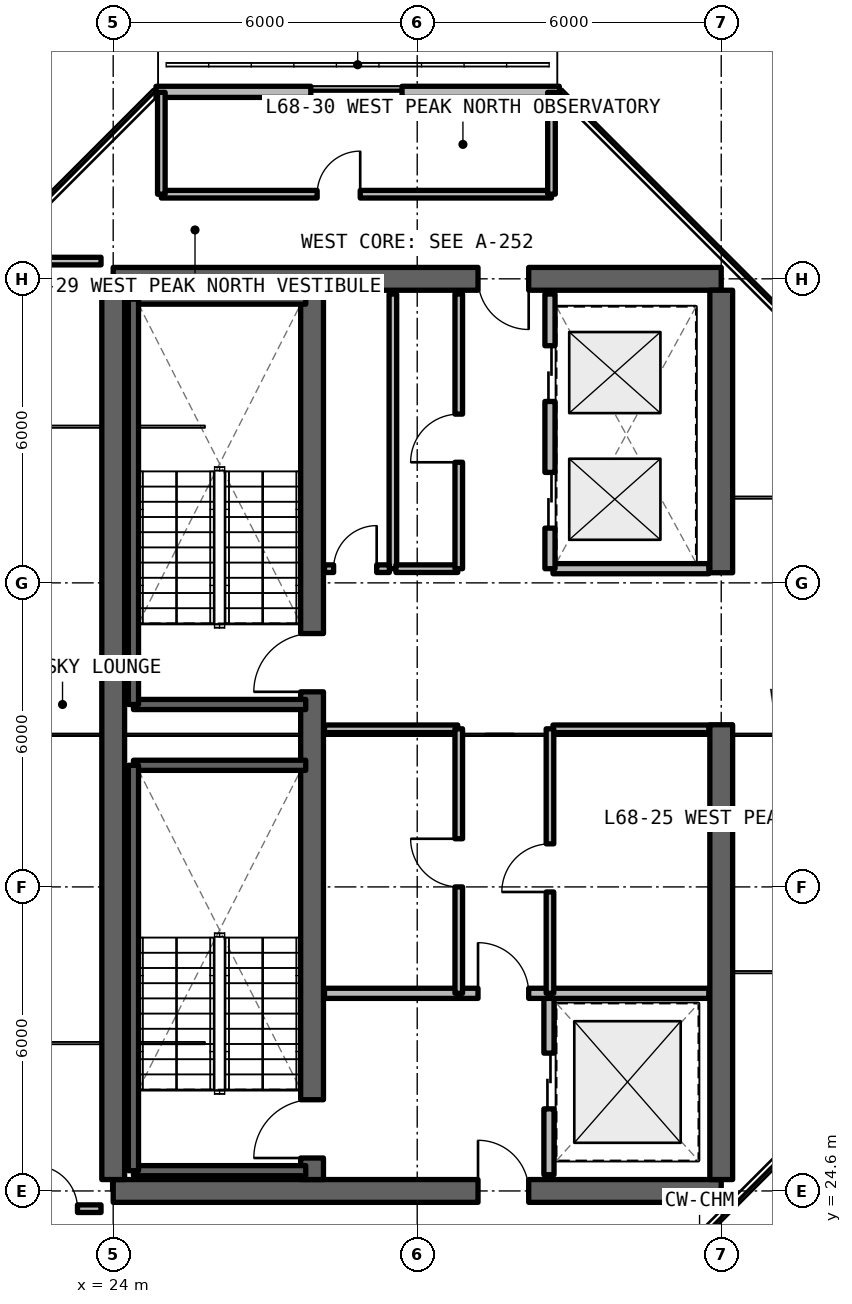
"""IFC4 building model, lengths in metres.
Left out: names, types, materials, properties, quantities, classifications, styles, units other than length and angle.
Written with IfcOpenShell. Run it as: python <this file> out.ifc"""

import sys

from ifc_helpers import new_model, si_unit, direction, frame, frame_2d, origin, place, context, subcontext, project, spatial, rectangle, extrude, element, fill, save


model = new_model("IFC4")
c1 = context("Model", 3, precision=1e-05, world=origin(), true_north=direction((0.0, 1.0)))
c2 = subcontext(c1, "Body", "Model", "MODEL_VIEW")
j1 = project(units=[si_unit("LENGTHUNIT", "METRE"), si_unit("PLANEANGLEUNIT", "RADIAN")], contexts=[c1])
p1 = place(None, origin())
s1 = spatial("IfcSite", under=j1, at=p1, CompositionType="ELEMENT")
p2 = place(p1, origin())
s2 = spatial("IfcBuilding", under=s1, at=p2, CompositionType="ELEMENT")
p3 = place(p2, frame((0.0, 0.0, 242.55)))
s3 = spatial("IfcBuildingStorey", under=s2, at=p3, CompositionType="ELEMENT", Elevation=242.55)
p4 = place(p3, frame((24.0, 24.6, 0.0), z_axis=(0.0, 0.0, 1.0), x_axis=(1.0, 0.0, 0.0)))
e1 = element("IfcWall", 1, at=p4, inside=s3, PredefinedType="SHEAR", context=c2, shape_type="SweptSolid", body=[
    extrude(rectangle(XDim=12.0, YDim=0.45, at=frame_2d((6.0, 0.0))), origin(), (0.0, 0.0, 1.0), 3.63),
])
p5 = place(p4, frame((7.2, 0.0, 0.0)))
e2 = element("IfcOpeningElement", 2, at=p5, cuts=e1, PredefinedType="OPENING", context=c2, shape_type="SweptSolid", body=[
    extrude(rectangle(XDim=1.0, YDim=2.15, at=frame_2d((0.5, 1.075))), frame((0.0, 0.235, 0.0), z_axis=(0.0, -1.0, 0.0), x_axis=(1.0, 0.0, 0.0)), (0.0, 0.0, 1.0), 0.47),
])
p6 = place(p3, frame((36.0, 42.6, 0.0), z_axis=(0.0, 0.0, 1.0), x_axis=(-1.0, 0.0, 0.0)))
e3 = element("IfcWall", 3, at=p6, inside=s3, PredefinedType="SHEAR", context=c2, shape_type="SweptSolid", body=[
    extrude(rectangle(XDim=12.0, YDim=0.45, at=frame_2d((6.0, 0.0))), origin(), (0.0, 0.0, 1.0), 3.63),
])
p7 = place(p6, frame((3.8, 0.0, 0.0)))
e4 = element("IfcOpeningElement", 4, at=p7, cuts=e3, PredefinedType="OPENING", context=c2, shape_type="SweptSolid", body=[
    extrude(rectangle(XDim=1.0, YDim=2.15, at=frame_2d((0.5, 1.075))), frame((0.0, 0.235, 0.0), z_axis=(0.0, -1.0, 0.0), x_axis=(1.0, 0.0, 0.0)), (0.0, 0.0, 1.0), 0.47),
])
p8 = place(p3, frame((24.0, 24.825, 0.0), z_axis=(0.0, 0.0, 1.0), x_axis=(0.0, 1.0, 0.0)))
e5 = element("IfcWall", 5, at=p8, inside=s3, PredefinedType="SHEAR", context=c2, shape_type="SweptSolid", body=[
    extrude(rectangle(XDim=17.55, YDim=0.45, at=frame_2d((8.775, 0.0))), origin(), (0.0, 0.0, 1.0), 3.63),
])
p9 = place(p3, frame((36.0, 24.825, 0.0), z_axis=(0.0, 0.0, 1.0), x_axis=(0.0, 1.0, 0.0)))
e6 = element("IfcWall", 6, at=p9, inside=s3, PredefinedType="SHEAR", context=c2, shape_type="SweptSolid", body=[
    extrude(rectangle(XDim=8.975, YDim=0.45, at=frame_2d((4.488, 0.0))), origin(), (0.0, 0.0, 1.0), 3.63),
])
p10 = place(p3, frame((36.0, 36.8, 0.0), z_axis=(0.0, 0.0, 1.0), x_axis=(0.0, 1.0, 0.0)))
e7 = element("IfcWall", 7, at=p10, inside=s3, PredefinedType="SHEAR", context=c2, shape_type="SweptSolid", body=[
    extrude(rectangle(XDim=5.575, YDim=0.45, at=frame_2d((2.788, 0.0))), origin(), (0.0, 0.0, 1.0), 3.63),
])
p11 = place(p3, frame((27.925, 24.825, 0.0), z_axis=(0.0, 0.0, 1.0), x_axis=(0.0, 1.0, 0.0)))
e8 = element("IfcWall", 8, at=p11, inside=s3, PredefinedType="SHEAR", context=c2, shape_type="SweptSolid", body=[
    extrude(rectangle(XDim=17.55, YDim=0.45, at=frame_2d((8.775, 0.0))), origin(), (0.0, 0.0, 1.0), 3.63),
])
p12 = place(p11, frame((0.425, 0.0, 0.0)))
e9 = element("IfcOpeningElement", 9, at=p12, cuts=e8, PredefinedType="OPENING", context=c2, shape_type="SweptSolid", body=[
    extrude(rectangle(XDim=1.15, YDim=2.15, at=frame_2d((0.575, 1.075))), frame((0.0, 0.235, 0.0), z_axis=(0.0, -1.0, 0.0), x_axis=(1.0, 0.0, 0.0)), (0.0, 0.0, 1.0), 0.47),
])
p13 = place(p11, frame((9.625, 0.0, 0.0)))
e10 = element("IfcOpeningElement", 10, at=p13, cuts=e8, PredefinedType="OPENING", context=c2, shape_type="SweptSolid", body=[
    extrude(rectangle(XDim=1.15, YDim=2.15, at=frame_2d((0.575, 1.075))), frame((0.0, 0.235, 0.0), z_axis=(0.0, -1.0, 0.0), x_axis=(1.0, 0.0, 0.0)), (0.0, 0.0, 1.0), 0.47),
])
p14 = place(p3, frame((32.804, 46.29, 0.0), z_axis=(0.0, 0.0, 1.0), x_axis=(-1.0, 0.0, 0.0)))
e11 = element("IfcWall", 11, at=p14, inside=s3, PredefinedType="SOLIDWALL", context=c2, shape_type="SweptSolid", body=[
    extrude(rectangle(XDim=7.959, YDim=0.22, at=frame_2d((3.979, 0.0))), origin(), (0.0, 0.0, 1.0), 3.41),
])
p15 = place(p14, frame((3.104, 0.0, 0.78)))
e12 = element("IfcOpeningElement", 12, at=p15, cuts=e11, PredefinedType="OPENING", context=c2, shape_type="SweptSolid", body=[
    extrude(rectangle(XDim=1.8, YDim=1.66, at=frame_2d((0.9, 0.83))), frame((0.0, 0.12, 0.0), z_axis=(0.0, -1.0, 0.0), x_axis=(1.0, 0.0, 0.0)), (0.0, 0.0, 1.0), 0.24),
])
p16 = place(p3, frame((32.6, 24.92, 0.0), z_axis=(0.0, 0.0, 1.0), x_axis=(0.0, 1.0, 0.0)))
e13 = element("IfcWall", 13, at=p16, inside=s3, PredefinedType="SOLIDWALL", context=c2, shape_type="SweptSolid", body=[
    extrude(rectangle(XDim=3.58, YDim=0.2, at=frame_2d((1.79, 0.0))), origin(), (0.0, 0.0, 1.0), 2.63),
])
p17 = place(p16, frame((1.3, 0.0, 0.0)))
e14 = element("IfcOpeningElement", 14, at=p17, cuts=e13, PredefinedType="OPENING", context=c2, shape_type="SweptSolid", body=[
    extrude(rectangle(XDim=1.1, YDim=2.2, at=frame_2d((0.55, 1.1))), frame((0.0, 0.11, 0.0), z_axis=(0.0, -1.0, 0.0), x_axis=(1.0, 0.0, 0.0)), (0.0, 0.0, 1.0), 0.22),
])
p18 = place(p3, frame((28.17, 28.5, 0.0), z_axis=(0.0, 0.0, 1.0), x_axis=(1.0, 0.0, 0.0)))
e15 = element("IfcWall", 15, at=p18, inside=s3, PredefinedType="SOLIDWALL", context=c2, shape_type="SweptSolid", body=[
    extrude(rectangle(XDim=7.585, YDim=0.2, at=frame_2d((3.792, 0.0))), origin(), (0.0, 0.0, 1.0), 2.63),
])
p19 = place(p18, frame((3.03, 0.0, 0.0)))
e16 = element("IfcOpeningElement", 16, at=p19, cuts=e15, PredefinedType="OPENING", context=c2, shape_type="SweptSolid", body=[
    extrude(rectangle(XDim=1.0, YDim=2.15, at=frame_2d((0.5, 1.075))), frame((0.0, 0.11, 0.0), z_axis=(0.0, -1.0, 0.0), x_axis=(1.0, 0.0, 0.0)), (0.0, 0.0, 1.0), 0.22),
])
p20 = place(p3, frame((28.17, 33.72, 0.0), z_axis=(0.0, 0.0, 1.0), x_axis=(1.0, 0.0, 0.0)))
e17 = element("IfcWall", 17, at=p20, inside=s3, PredefinedType="SOLIDWALL", context=c2, shape_type="SweptSolid", body=[
    extrude(rectangle(XDim=2.63, YDim=0.15, at=frame_2d((1.315, 0.0))), origin(), (0.0, 0.0, 1.0), 2.63),
])
p21 = place(p3, frame((30.82, 28.5, 0.0), z_axis=(0.0, 0.0, 1.0), x_axis=(0.0, 1.0, 0.0)))
e18 = element("IfcWall", 18, at=p21, inside=s3, PredefinedType="SOLIDWALL", context=c2, shape_type="SweptSolid", body=[
    extrude(rectangle(XDim=5.22, YDim=0.15, at=frame_2d((2.61, 0.0))), origin(), (0.0, 0.0, 1.0), 2.63),
])
p22 = place(p21, frame((2.1, 0.0, 0.0)))
e19 = element("IfcOpeningElement", 19, at=p22, cuts=e18, PredefinedType="OPENING", context=c2, shape_type="SweptSolid", body=[
    extrude(rectangle(XDim=0.95, YDim=2.15, at=frame_2d((0.475, 1.075))), frame((0.0, 0.085, 0.0), z_axis=(0.0, -1.0, 0.0), x_axis=(1.0, 0.0, 0.0)), (0.0, 0.0, 1.0), 0.17),
])
p23 = place(p3, frame((32.68, 33.72, 0.0), z_axis=(0.0, 0.0, 1.0), x_axis=(1.0, 0.0, 0.0)))
e20 = element("IfcWall", 20, at=p23, inside=s3, PredefinedType="SOLIDWALL", context=c2, shape_type="SweptSolid", body=[
    extrude(rectangle(XDim=3.075, YDim=0.15, at=frame_2d((1.538, 0.0))), origin(), (0.0, 0.0, 1.0), 2.63),
])
p24 = place(p3, frame((32.62, 28.5, 0.0), z_axis=(0.0, 0.0, 1.0), x_axis=(0.0, 1.0, 0.0)))
e21 = element("IfcWall", 21, at=p24, inside=s3, PredefinedType="SOLIDWALL", context=c2, shape_type="SweptSolid", body=[
    extrude(rectangle(XDim=5.22, YDim=0.15, at=frame_2d((2.61, 0.0))), origin(), (0.0, 0.0, 1.0), 2.63),
])
p25 = place(p24, frame((2.0, 0.0, 0.0)))
e22 = element("IfcOpeningElement", 22, at=p25, cuts=e21, PredefinedType="OPENING", context=c2, shape_type="SweptSolid", body=[
    extrude(rectangle(XDim=0.95, YDim=2.15, at=frame_2d((0.475, 1.075))), frame((0.0, 0.085, 0.0), z_axis=(0.0, -1.0, 0.0), x_axis=(1.0, 0.0, 0.0)), (0.0, 0.0, 1.0), 0.17),
])
p26 = place(p3, frame((29.52, 36.88, 0.0), z_axis=(0.0, 0.0, 1.0), x_axis=(0.0, 1.0, 0.0)))
e23 = element("IfcWall", 23, at=p26, inside=s3, PredefinedType="SOLIDWALL", context=c2, shape_type="SweptSolid", body=[
    extrude(rectangle(XDim=5.42, YDim=0.15, at=frame_2d((2.71, 0.0))), origin(), (0.0, 0.0, 1.0), 2.63),
])
p27 = place(p3, frame((28.17, 36.88, 0.0), z_axis=(0.0, 0.0, 1.0), x_axis=(1.0, 0.0, 0.0)))
e24 = element("IfcWall", 24, at=p27, inside=s3, PredefinedType="SOLIDWALL", context=c2, shape_type="SweptSolid", body=[
    extrude(rectangle(XDim=1.28, YDim=0.15, at=frame_2d((0.64, 0.0))), origin(), (0.0, 0.0, 1.0), 2.63),
])
p28 = place(p27, frame((0.18, 0.0, 0.0)))
e25 = element("IfcOpeningElement", 25, at=p28, cuts=e24, PredefinedType="OPENING", context=c2, shape_type="SweptSolid", body=[
    extrude(rectangle(XDim=0.85, YDim=2.1, at=frame_2d((0.425, 1.05))), frame((0.0, 0.085, 0.0), z_axis=(0.0, -1.0, 0.0), x_axis=(1.0, 0.0, 0.0)), (0.0, 0.0, 1.0), 0.17),
])
p29 = place(p3, frame((29.58, 36.88, 0.0), z_axis=(0.0, 0.0, 1.0), x_axis=(1.0, 0.0, 0.0)))
e26 = element("IfcWall", 26, at=p29, inside=s3, PredefinedType="SOLIDWALL", context=c2, shape_type="SweptSolid", body=[
    extrude(rectangle(XDim=1.22, YDim=0.15, at=frame_2d((0.61, 0.0))), origin(), (0.0, 0.0, 1.0), 2.63),
])
p30 = place(p3, frame((30.82, 36.88, 0.0), z_axis=(0.0, 0.0, 1.0), x_axis=(0.0, 1.0, 0.0)))
e27 = element("IfcWall", 27, at=p30, inside=s3, PredefinedType="SOLIDWALL", context=c2, shape_type="SweptSolid", body=[
    extrude(rectangle(XDim=5.42, YDim=0.15, at=frame_2d((2.71, 0.0))), origin(), (0.0, 0.0, 1.0), 2.63),
])
p31 = place(p30, frame((2.1, 0.0, 0.0)))
e28 = element("IfcOpeningElement", 28, at=p31, cuts=e27, PredefinedType="OPENING", context=c2, shape_type="SweptSolid", body=[
    extrude(rectangle(XDim=0.95, YDim=2.15, at=frame_2d((0.475, 1.075))), frame((0.0, 0.085, 0.0), z_axis=(0.0, -1.0, 0.0), x_axis=(1.0, 0.0, 0.0)), (0.0, 0.0, 1.0), 0.17),
])
p32 = place(p3, frame((32.68, 36.88, 0.0), z_axis=(0.0, 0.0, 1.0), x_axis=(1.0, 0.0, 0.0)))
e29 = element("IfcWall", 29, at=p32, inside=s3, PredefinedType="SOLIDWALL", context=c2, shape_type="SweptSolid", body=[
    extrude(rectangle(XDim=3.075, YDim=0.2, at=frame_2d((1.538, 0.0))), origin(), (0.0, 0.0, 1.0), 2.63),
])
p33 = place(p3, frame((32.62, 36.88, 0.0), z_axis=(0.0, 0.0, 1.0), x_axis=(0.0, 1.0, 0.0)))
e30 = element("IfcWall", 30, at=p33, inside=s3, PredefinedType="SOLIDWALL", context=c2, shape_type="SweptSolid", body=[
    extrude(rectangle(XDim=5.42, YDim=0.2, at=frame_2d((2.71, 0.0))), origin(), (0.0, 0.0, 1.0), 2.63),
])
p34 = place(p33, frame((0.8, 0.0, 0.0)))
e31 = element("IfcOpeningElement", 31, at=p34, cuts=e30, PredefinedType="OPENING", context=c2, shape_type="SweptSolid", body=[
    extrude(rectangle(XDim=1.1, YDim=2.2, at=frame_2d((0.55, 1.1))), frame((0.0, 0.11, 0.0), z_axis=(0.0, -1.0, 0.0), x_axis=(1.0, 0.0, 0.0)), (0.0, 0.0, 1.0), 0.22),
])
p35 = place(p33, frame((3.3, 0.0, 0.0)))
e32 = element("IfcOpeningElement", 32, at=p35, cuts=e30, PredefinedType="OPENING", context=c2, shape_type="SweptSolid", body=[
    extrude(rectangle(XDim=1.1, YDim=2.2, at=frame_2d((0.55, 1.1))), frame((0.0, 0.11, 0.0), z_axis=(0.0, -1.0, 0.0), x_axis=(1.0, 0.0, 0.0)), (0.0, 0.0, 1.0), 0.22),
])
p36 = place(p3, frame((22.12, 24.25, 0.0), z_axis=(0.0, 0.0, 1.0), x_axis=(1.0, 0.0, 0.0)))
e33 = element("IfcWall", 33, at=p36, inside=s3, PredefinedType="SOLIDWALL", context=c2, shape_type="SweptSolid", body=[
    extrude(rectangle(XDim=1.64, YDim=0.15, at=frame_2d((0.82, 0.0))), origin(), (0.0, 0.0, 1.0), 2.63),
])
p37 = place(p36, frame((0.325, 0.0, 0.0)))
e34 = element("IfcOpeningElement", 34, at=p37, cuts=e33, PredefinedType="OPENING", context=c2, shape_type="SweptSolid", body=[
    extrude(rectangle(XDim=0.85, YDim=2.1, at=frame_2d((0.425, 1.05))), frame((0.0, 0.085, 0.0), z_axis=(0.0, -1.0, 0.0), x_axis=(1.0, 0.0, 0.0)), (0.0, 0.0, 1.0), 0.17),
])
p38 = place(p3, frame((22.12, 42.95, 0.0), z_axis=(0.0, 0.0, 1.0), x_axis=(1.0, 0.0, 0.0)))
e35 = element("IfcWall", 35, at=p38, inside=s3, PredefinedType="SOLIDWALL", context=c2, shape_type="SweptSolid", body=[
    extrude(rectangle(XDim=1.64, YDim=0.15, at=frame_2d((0.82, 0.0))), origin(), (0.0, 0.0, 1.0), 2.63),
])
p39 = place(p3, frame((24.95, 44.27, 0.0), z_axis=(0.0, 0.0, 1.0), x_axis=(1.0, 0.0, 0.0)))
e36 = element("IfcWall", 36, at=p39, inside=s3, PredefinedType="SOLIDWALL", context=c2, shape_type="SweptSolid", body=[
    extrude(rectangle(XDim=7.7, YDim=0.15, at=frame_2d((3.85, 0.0))), origin(), (0.0, 0.0, 1.0), 2.63),
])
p40 = place(p39, frame((3.075, 0.0, 0.0)))
e37 = element("IfcOpeningElement", 37, at=p40, cuts=e36, PredefinedType="OPENING", context=c2, shape_type="SweptSolid", body=[
    extrude(rectangle(XDim=0.85, YDim=2.1, at=frame_2d((0.425, 1.05))), frame((0.0, 0.085, 0.0), z_axis=(0.0, -1.0, 0.0), x_axis=(1.0, 0.0, 0.0)), (0.0, 0.0, 1.0), 0.17),
])
for number, where, z_axis, x_axis in (
    (38, (24.95, 44.27, 0.0), (0.0, 0.0, 1.0), (0.0, 1.0, 0.0)),
    (39, (32.65, 44.27, 0.0), (0.0, 0.0, 1.0), (0.0, 1.0, 0.0)),
):
    element("IfcWall", number, at=place(p3, frame(where, z_axis=z_axis, x_axis=x_axis)), inside=s3, PredefinedType="SOLIDWALL", context=c2, shape_type="SweptSolid", body=[
        extrude(rectangle(XDim=2.01, YDim=0.15, at=frame_2d((1.005, 0.0))), origin(), (0.0, 0.0, 1.0), 2.63),
    ])
for number, where, z_axis, x_axis in (
    (40, (24.4, 25.0, 0.0), (0.0, 0.0, 1.0), (1.0, 0.0, 0.0)),
    (41, (27.8, 33.0, 0.0), (0.0, 0.0, 1.0), (-1.0, 0.0, 0.0)),
):
    element("IfcWall", number, at=place(p3, frame(where, z_axis=z_axis, x_axis=x_axis)), inside=s3, PredefinedType="SOLIDWALL", context=c2, shape_type="SweptSolid", body=[
        extrude(rectangle(XDim=3.4, YDim=0.2, at=frame_2d((1.7, 0.0))), origin(), (0.0, 0.0, 1.0), 3.63),
    ])
p41 = place(p3, frame((24.4, 33.0, 0.0), z_axis=(0.0, 0.0, 1.0), x_axis=(0.0, -1.0, 0.0)))
e42 = element("IfcWall", 42, at=p41, inside=s3, PredefinedType="SOLIDWALL", context=c2, shape_type="SweptSolid", body=[
    extrude(rectangle(XDim=8.0, YDim=0.2, at=frame_2d((4.0, 0.0))), origin(), (0.0, 0.0, 1.0), 3.63),
])
for number, where, z_axis, x_axis in (
    (43, (24.4, 34.2, 0.0), (0.0, 0.0, 1.0), (1.0, 0.0, 0.0)),
    (44, (27.8, 42.2, 0.0), (0.0, 0.0, 1.0), (-1.0, 0.0, 0.0)),
):
    element("IfcWall", number, at=place(p3, frame(where, z_axis=z_axis, x_axis=x_axis)), inside=s3, PredefinedType="SOLIDWALL", context=c2, shape_type="SweptSolid", body=[
        extrude(rectangle(XDim=3.4, YDim=0.2, at=frame_2d((1.7, 0.0))), origin(), (0.0, 0.0, 1.0), 3.63),
    ])
p42 = place(p3, frame((24.4, 42.2, 0.0), z_axis=(0.0, 0.0, 1.0), x_axis=(0.0, -1.0, 0.0)))
e45 = element("IfcWall", 45, at=p42, inside=s3, PredefinedType="SOLIDWALL", context=c2, shape_type="SweptSolid", body=[
    extrude(rectangle(XDim=8.0, YDim=0.2, at=frame_2d((4.0, 0.0))), origin(), (0.0, 0.0, 1.0), 3.63),
])
p43 = place(p15, origin())
e46 = element("IfcWindow", 46, at=p43, inside=s3, PartitioningType="SINGLE_PANEL", PredefinedType="WINDOW", context=c2, shape_type="SweptSolid", body=[
    extrude(rectangle(XDim=1.8, YDim=1.66, at=frame_2d((0.9, 0.83))), frame((0.0, 0.03, 0.0), z_axis=(0.0, -1.0, 0.0), x_axis=(1.0, 0.0, 0.0)), (0.0, 0.0, 1.0), 0.06),
])
fill(e12, e46)
p44 = place(p17, origin())
e47 = element("IfcDoor", 47, at=p44, inside=s3, OperationType="SLIDING_TO_LEFT", PredefinedType="DOOR", context=c2, shape_type="SweptSolid", body=[
    extrude(rectangle(XDim=1.1, YDim=2.2, at=frame_2d((0.55, 1.1))), frame((0.0, 0.025, 0.0), z_axis=(0.0, -1.0, 0.0), x_axis=(1.0, 0.0, 0.0)), (0.0, 0.0, 1.0), 0.05),
])
fill(e14, e47)
p45 = place(p19, origin())
e48 = element("IfcDoor", 48, at=p45, inside=s3, OperationType="SINGLE_SWING_LEFT", PredefinedType="DOOR", context=c2, shape_type="SweptSolid", body=[
    extrude(rectangle(XDim=1.0, YDim=2.15, at=frame_2d((0.5, 1.075))), frame((0.0, 0.025, 0.0), z_axis=(0.0, -1.0, 0.0), x_axis=(1.0, 0.0, 0.0)), (0.0, 0.0, 1.0), 0.05),
])
fill(e16, e48)
p46 = place(p22, origin())
e49 = element("IfcDoor", 49, at=p46, inside=s3, OperationType="SINGLE_SWING_RIGHT", PredefinedType="DOOR", context=c2, shape_type="SweptSolid", body=[
    extrude(rectangle(XDim=0.95, YDim=2.15, at=frame_2d((0.475, 1.075))), frame((0.0, 0.025, 0.0), z_axis=(0.0, -1.0, 0.0), x_axis=(1.0, 0.0, 0.0)), (0.0, 0.0, 1.0), 0.05),
])
fill(e19, e49)
p47 = place(p25, origin())
e50 = element("IfcDoor", 50, at=p47, inside=s3, OperationType="SINGLE_SWING_LEFT", PredefinedType="DOOR", context=c2, shape_type="SweptSolid", body=[
    extrude(rectangle(XDim=0.95, YDim=2.15, at=frame_2d((0.475, 1.075))), frame((0.0, 0.025, 0.0), z_axis=(0.0, -1.0, 0.0), x_axis=(1.0, 0.0, 0.0)), (0.0, 0.0, 1.0), 0.05),
])
fill(e22, e50)
p48 = place(p28, origin())
e51 = element("IfcDoor", 51, at=p48, inside=s3, OperationType="SINGLE_SWING_RIGHT", PredefinedType="DOOR", context=c2, shape_type="SweptSolid", body=[
    extrude(rectangle(XDim=0.85, YDim=2.1, at=frame_2d((0.425, 1.05))), frame((0.0, 0.025, 0.0), z_axis=(0.0, -1.0, 0.0), x_axis=(1.0, 0.0, 0.0)), (0.0, 0.0, 1.0), 0.05),
])
fill(e25, e51)
p49 = place(p31, origin())
e52 = element("IfcDoor", 52, at=p49, inside=s3, OperationType="SINGLE_SWING_LEFT", PredefinedType="DOOR", context=c2, shape_type="SweptSolid", body=[
    extrude(rectangle(XDim=0.95, YDim=2.15, at=frame_2d((0.475, 1.075))), frame((0.0, 0.025, 0.0), z_axis=(0.0, -1.0, 0.0), x_axis=(1.0, 0.0, 0.0)), (0.0, 0.0, 1.0), 0.05),
])
fill(e28, e52)
p50 = place(p34, origin())
e53 = element("IfcDoor", 53, at=p50, inside=s3, OperationType="SLIDING_TO_LEFT", PredefinedType="DOOR", context=c2, shape_type="SweptSolid", body=[
    extrude(rectangle(XDim=1.1, YDim=2.2, at=frame_2d((0.55, 1.1))), frame((0.0, 0.025, 0.0), z_axis=(0.0, -1.0, 0.0), x_axis=(1.0, 0.0, 0.0)), (0.0, 0.0, 1.0), 0.05),
])
fill(e31, e53)
p51 = place(p35, origin())
e54 = element("IfcDoor", 54, at=p51, inside=s3, OperationType="SLIDING_TO_RIGHT", PredefinedType="DOOR", context=c2, shape_type="SweptSolid", body=[
    extrude(rectangle(XDim=1.1, YDim=2.2, at=frame_2d((0.55, 1.1))), frame((0.0, 0.025, 0.0), z_axis=(0.0, -1.0, 0.0), x_axis=(1.0, 0.0, 0.0)), (0.0, 0.0, 1.0), 0.05),
])
fill(e32, e54)
p52 = place(p37, origin())
e55 = element("IfcDoor", 55, at=p52, inside=s3, OperationType="SINGLE_SWING_LEFT", PredefinedType="DOOR", context=c2, shape_type="SweptSolid", body=[
    extrude(rectangle(XDim=0.85, YDim=2.1, at=frame_2d((0.425, 1.05))), frame((0.0, 0.025, 0.0), z_axis=(0.0, -1.0, 0.0), x_axis=(1.0, 0.0, 0.0)), (0.0, 0.0, 1.0), 0.05),
])
fill(e34, e55)
p53 = place(p40, origin())
e56 = element("IfcDoor", 56, at=p53, inside=s3, OperationType="SINGLE_SWING_RIGHT", PredefinedType="DOOR", context=c2, shape_type="SweptSolid", body=[
    extrude(rectangle(XDim=0.85, YDim=2.1, at=frame_2d((0.425, 1.05))), frame((0.0, 0.025, 0.0), z_axis=(0.0, -1.0, 0.0), x_axis=(1.0, 0.0, 0.0)), (0.0, 0.0, 1.0), 0.05),
])
fill(e37, e56)
p54 = place(p12, origin())
e57 = element("IfcDoor", 57, at=p54, inside=s3, OperationType="SINGLE_SWING_LEFT", PredefinedType="DOOR", context=c2, shape_type="SweptSolid", body=[
    extrude(rectangle(XDim=1.15, YDim=2.15, at=frame_2d((0.575, 1.075))), frame((0.0, 0.025, 0.0), z_axis=(0.0, -1.0, 0.0), x_axis=(1.0, 0.0, 0.0)), (0.0, 0.0, 1.0), 0.05),
])
fill(e9, e57)
p55 = place(p13, origin())
e58 = element("IfcDoor", 58, at=p55, inside=s3, OperationType="SINGLE_SWING_RIGHT", PredefinedType="DOOR", context=c2, shape_type="SweptSolid", body=[
    extrude(rectangle(XDim=1.15, YDim=2.15, at=frame_2d((0.575, 1.075))), frame((0.0, 0.025, 0.0), z_axis=(0.0, -1.0, 0.0), x_axis=(1.0, 0.0, 0.0)), (0.0, 0.0, 1.0), 0.05),
])
fill(e10, e58)
p56 = place(p5, origin())
e59 = element("IfcDoor", 59, at=p56, inside=s3, OperationType="SINGLE_SWING_LEFT", PredefinedType="DOOR", context=c2, shape_type="SweptSolid", body=[
    extrude(rectangle(XDim=1.0, YDim=2.15, at=frame_2d((0.5, 1.075))), frame((0.0, 0.025, 0.0), z_axis=(0.0, -1.0, 0.0), x_axis=(1.0, 0.0, 0.0)), (0.0, 0.0, 1.0), 0.05),
])
fill(e2, e59)
p57 = place(p7, origin())
e60 = element("IfcDoor", 60, at=p57, inside=s3, OperationType="SINGLE_SWING_RIGHT", PredefinedType="DOOR", context=c2, shape_type="SweptSolid", body=[
    extrude(rectangle(XDim=1.0, YDim=2.15, at=frame_2d((0.5, 1.075))), frame((0.0, 0.025, 0.0), z_axis=(0.0, -1.0, 0.0), x_axis=(1.0, 0.0, 0.0)), (0.0, 0.0, 1.0), 0.05),
])
fill(e4, e60)
save(model, sys.argv[1])
